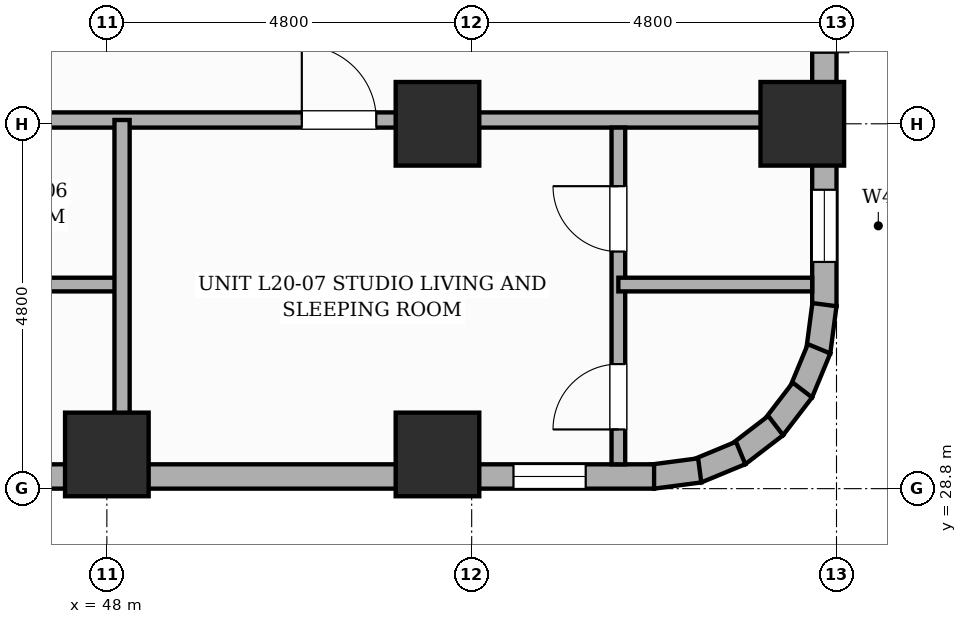
"""IFC4 building model, lengths in metres.
Left out: names, types, materials, properties, quantities, classifications, styles, units other than length and angle.
Written with IfcOpenShell. Run it as: python <this file> out.ifc"""

import sys

from ifc_helpers import new_model, si_unit, direction, frame, frame_2d, origin, origin_2d, place, context, subcontext, project, spatial, rectangle, extrude, element, fill, save


model = new_model("IFC4")
c1 = context("Model", 3, precision=1e-05, world=origin(), true_north=direction((0.0, 1.0)))
c2 = subcontext(c1, "Body", "Model", "MODEL_VIEW")
j1 = project(units=[si_unit("LENGTHUNIT", "METRE"), si_unit("PLANEANGLEUNIT", "RADIAN")], contexts=[c1])
p1 = place(None, origin())
s1 = spatial("IfcSite", under=j1, at=p1, CompositionType="ELEMENT")
p2 = place(p1, origin())
s2 = spatial("IfcBuilding", under=s1, at=p2, CompositionType="ELEMENT")
p3 = place(p2, frame((0.0, 0.0, 79.0)))
s3 = spatial("IfcBuildingStorey", under=s2, at=p3, CompositionType="ELEMENT", Elevation=79.0)
for number, where, z_axis, x_axis in (
    (1, (48.0, 29.25, 0.0), (0.0, 0.0, 1.0), (1.0, 0.0, 0.0)),
    (2, (52.35, 29.25, 0.0), (0.0, 0.0, 1.0), (1.0, 0.0, 0.0)),
    (3, (52.35, 33.6, 0.0), (0.0, 0.0, 1.0), (1.0, 0.0, 0.0)),
    (4, (57.15, 33.6, 0.0), (0.0, 0.0, 1.0), (1.0, 0.0, 0.0)),
):
    element("IfcColumn", number, at=place(p3, frame(where, z_axis=z_axis, x_axis=x_axis)), inside=s3, PredefinedType="COLUMN", context=c2, shape_type="SweptSolid", body=[
        extrude(rectangle(XDim=1.1, YDim=1.1, at=origin_2d()), origin(), (0.0, 0.0, 1.0), 3.6),
    ])
p4 = place(p3, frame((57.44, 45.6, 0.0), z_axis=(0.0, 0.0, 1.0), x_axis=(0.0, -1.0, 0.0)))
e5 = element("IfcWall", 5, at=p4, inside=s3, PredefinedType="STANDARD", context=c2, shape_type="SweptSolid", body=[
    extrude(rectangle(XDim=14.4, YDim=0.32, at=frame_2d((7.2, 0.0))), origin(), (0.0, 0.0, 1.0), 2.53),
])
p5 = place(p4, frame((4.75, 0.0, 0.0)))
e6 = element("IfcOpeningElement", 6, at=p5, cuts=e5, PredefinedType="OPENING", context=c2, shape_type="SweptSolid", body=[
    extrude(rectangle(XDim=1.1, YDim=2.15, at=frame_2d((0.55, 1.075))), frame((0.0, 0.17, 0.0), z_axis=(0.0, -1.0, 0.0), x_axis=(1.0, 0.0, 0.0)), (0.0, 0.0, 1.0), 0.34),
])
p6 = place(p4, frame((0.47, 0.0, 0.45)))
e7 = element("IfcOpeningElement", 7, at=p6, cuts=e5, PredefinedType="OPENING", context=c2, shape_type="SweptSolid", body=[
    extrude(rectangle(XDim=0.95, YDim=1.8, at=frame_2d((0.475, 0.9))), frame((0.0, 0.17, 0.0), z_axis=(0.0, -1.0, 0.0), x_axis=(1.0, 0.0, 0.0)), (0.0, 0.0, 1.0), 0.34),
])
p7 = place(p4, frame((10.115, 0.0, 0.45)))
e8 = element("IfcOpeningElement", 8, at=p7, cuts=e5, PredefinedType="OPENING", context=c2, shape_type="SweptSolid", body=[
    extrude(rectangle(XDim=0.95, YDim=1.8, at=frame_2d((0.475, 0.9))), frame((0.0, 0.17, 0.0), z_axis=(0.0, -1.0, 0.0), x_axis=(1.0, 0.0, 0.0)), (0.0, 0.0, 1.0), 0.34),
])
p8 = place(p4, frame((12.867, 0.0, 0.45)))
e9 = element("IfcOpeningElement", 9, at=p8, cuts=e5, PredefinedType="OPENING", context=c2, shape_type="SweptSolid", body=[
    extrude(rectangle(XDim=0.95, YDim=1.8, at=frame_2d((0.475, 0.9))), frame((0.0, 0.17, 0.0), z_axis=(0.0, -1.0, 0.0), x_axis=(1.0, 0.0, 0.0)), (0.0, 0.0, 1.0), 0.34),
])
p9 = place(p4, frame((8.05, 0.0, 0.65)))
e10 = element("IfcOpeningElement", 10, at=p9, cuts=e5, PredefinedType="OPENING", context=c2, shape_type="SweptSolid", body=[
    extrude(rectangle(XDim=1.4, YDim=1.1, at=frame_2d((0.7, 0.55))), frame((0.0, 0.17, 0.0), z_axis=(0.0, -1.0, 0.0), x_axis=(1.0, 0.0, 0.0)), (0.0, 0.0, 1.0), 0.34),
])
p10 = place(p4, frame((3.194, 0.0, 0.45)))
e11 = element("IfcOpeningElement", 11, at=p10, cuts=e5, PredefinedType="OPENING", context=c2, shape_type="SweptSolid", body=[
    extrude(rectangle(XDim=0.95, YDim=1.8, at=frame_2d((0.475, 0.9))), frame((0.0, 0.17, 0.0), z_axis=(0.0, -1.0, 0.0), x_axis=(1.0, 0.0, 0.0)), (0.0, 0.0, 1.0), 0.34),
])
p11 = place(p3, frame((57.441, 31.221, 0.0), z_axis=(0.0, 0.0, 1.0), x_axis=(-0.130504898859, -0.991447664465, 0.0)))
e12 = element("IfcWall", 12, at=p11, inside=s3, PredefinedType="STANDARD", context=c2, shape_type="SweptSolid", body=[
    extrude(rectangle(XDim=0.627, YDim=0.32, at=frame_2d((0.313, 0.0))), origin(), (0.0, 0.0, 1.0), 3.35),
])
p12 = place(p3, frame((57.37, 30.64, 0.0), z_axis=(0.0, 0.0, 1.0), x_axis=(-0.382787856107, -0.923836271867, 0.0)))
e13 = element("IfcWall", 13, at=p12, inside=s3, PredefinedType="STANDARD", context=c2, shape_type="SweptSolid", body=[
    extrude(rectangle(XDim=0.626, YDim=0.32, at=frame_2d((0.313, 0.0))), origin(), (0.0, 0.0, 1.0), 3.35),
])
p13 = place(p3, frame((57.152, 30.097, 0.0), z_axis=(0.0, 0.0, 1.0), x_axis=(-0.608693302629, -0.793405610854, 0.0)))
e14 = element("IfcWall", 14, at=p13, inside=s3, PredefinedType="STANDARD", context=c2, shape_type="SweptSolid", body=[
    extrude(rectangle(XDim=0.626, YDim=0.32, at=frame_2d((0.313, 0.0))), origin(), (0.0, 0.0, 1.0), 3.35),
])
p14 = place(p3, frame((56.8, 29.63, 0.0), z_axis=(0.0, 0.0, 1.0), x_axis=(-0.793361818833, -0.608750379399, 0.0)))
e15 = element("IfcWall", 15, at=p14, inside=s3, PredefinedType="STANDARD", context=c2, shape_type="SweptSolid", body=[
    extrude(rectangle(XDim=0.627, YDim=0.32, at=frame_2d((0.313, 0.0))), origin(), (0.0, 0.0, 1.0), 3.35),
])
for number, where, z_axis, x_axis in (
    (16, (56.339, 29.269, 0.0), (0.0, 0.0, 1.0), (-0.924, -0.383, 0.0)),
    (17, (55.8, 29.04, 0.0), (0.0, 0.0, 1.0), (-0.991, -0.131, 0.0)),
):
    element("IfcWall", number, at=place(p3, frame(where, z_axis=z_axis, x_axis=x_axis)), inside=s3, PredefinedType="STANDARD", context=c2, shape_type="SweptSolid", body=[
        extrude(rectangle(XDim=0.626, YDim=0.32, at=frame_2d((0.313, 0.0))), origin(), (0.0, 0.0, 1.0), 3.35),
    ])
p15 = place(p3, frame((55.2, 28.96, 0.0), z_axis=(0.0, 0.0, 1.0), x_axis=(-1.0, 0.0, 0.0)))
e18 = element("IfcWall", 18, at=p15, inside=s3, PredefinedType="STANDARD", context=c2, shape_type="SweptSolid", body=[
    extrude(rectangle(XDim=28.8, YDim=0.32, at=frame_2d((14.4, 0.0))), origin(), (0.0, 0.0, 1.0), 2.53),
])
p16 = place(p15, frame((24.64, 0.0, 0.45)))
e19 = element("IfcOpeningElement", 19, at=p16, cuts=e18, PredefinedType="OPENING", context=c2, shape_type="SweptSolid", body=[
    extrude(rectangle(XDim=0.95, YDim=1.8, at=frame_2d((0.475, 0.9))), frame((0.0, 0.17, 0.0), z_axis=(0.0, -1.0, 0.0), x_axis=(1.0, 0.0, 0.0)), (0.0, 0.0, 1.0), 0.34),
])
p17 = place(p15, frame((19.979, 0.0, 0.45)))
e20 = element("IfcOpeningElement", 20, at=p17, cuts=e18, PredefinedType="OPENING", context=c2, shape_type="SweptSolid", body=[
    extrude(rectangle(XDim=0.75, YDim=1.8, at=frame_2d((0.375, 0.9))), frame((0.0, 0.17, 0.0), z_axis=(0.0, -1.0, 0.0), x_axis=(1.0, 0.0, 0.0)), (0.0, 0.0, 1.0), 0.34),
])
p18 = place(p15, frame((10.374, 0.0, 0.45)))
e21 = element("IfcOpeningElement", 21, at=p18, cuts=e18, PredefinedType="OPENING", context=c2, shape_type="SweptSolid", body=[
    extrude(rectangle(XDim=0.75, YDim=1.8, at=frame_2d((0.375, 0.9))), frame((0.0, 0.17, 0.0), z_axis=(0.0, -1.0, 0.0), x_axis=(1.0, 0.0, 0.0)), (0.0, 0.0, 1.0), 0.34),
])
p19 = place(p15, frame((0.9, 0.0, 0.45)))
e22 = element("IfcOpeningElement", 22, at=p19, cuts=e18, PredefinedType="OPENING", context=c2, shape_type="SweptSolid", body=[
    extrude(rectangle(XDim=0.95, YDim=1.8, at=frame_2d((0.475, 0.9))), frame((0.0, 0.17, 0.0), z_axis=(0.0, -1.0, 0.0), x_axis=(1.0, 0.0, 0.0)), (0.0, 0.0, 1.0), 0.34),
])
p20 = place(p15, frame((17.824, 0.0, 0.65)))
e23 = element("IfcOpeningElement", 23, at=p20, cuts=e18, PredefinedType="OPENING", context=c2, shape_type="SweptSolid", body=[
    extrude(rectangle(XDim=1.4, YDim=1.1, at=frame_2d((0.7, 0.55))), frame((0.0, 0.17, 0.0), z_axis=(0.0, -1.0, 0.0), x_axis=(1.0, 0.0, 0.0)), (0.0, 0.0, 1.0), 0.34),
])
p21 = place(p15, frame((8.219, 0.0, 0.65)))
e24 = element("IfcOpeningElement", 24, at=p21, cuts=e18, PredefinedType="OPENING", context=c2, shape_type="SweptSolid", body=[
    extrude(rectangle(XDim=1.4, YDim=1.1, at=frame_2d((0.7, 0.55))), frame((0.0, 0.17, 0.0), z_axis=(0.0, -1.0, 0.0), x_axis=(1.0, 0.0, 0.0)), (0.0, 0.0, 1.0), 0.34),
])
p22 = place(p3, frame((22.75, 33.65, 0.0), z_axis=(0.0, 0.0, 1.0), x_axis=(1.0, 0.0, 0.0)))
e25 = element("IfcWall", 25, at=p22, inside=s3, PredefinedType="PARTITIONING", context=c2, shape_type="SweptSolid", body=[
    extrude(rectangle(XDim=34.53, YDim=0.2, at=frame_2d((17.265, 0.0))), origin(), (0.0, 0.0, 1.0), 2.53),
])
p23 = place(p22, frame((5.495, 0.0, 0.0)))
e26 = element("IfcOpeningElement", 26, at=p23, cuts=e25, PredefinedType="OPENING", context=c2, shape_type="SweptSolid", body=[
    extrude(rectangle(XDim=0.98, YDim=2.18, at=frame_2d((0.49, 1.09))), frame((0.0, 0.11, 0.0), z_axis=(0.0, -1.0, 0.0), x_axis=(1.0, 0.0, 0.0)), (0.0, 0.0, 1.0), 0.22),
])
p24 = place(p22, frame((9.961, 0.0, 0.0)))
e27 = element("IfcOpeningElement", 27, at=p24, cuts=e25, PredefinedType="OPENING", context=c2, shape_type="SweptSolid", body=[
    extrude(rectangle(XDim=0.98, YDim=2.18, at=frame_2d((0.49, 1.09))), frame((0.0, 0.11, 0.0), z_axis=(0.0, -1.0, 0.0), x_axis=(1.0, 0.0, 0.0)), (0.0, 0.0, 1.0), 0.22),
])
p25 = place(p22, frame((19.066, 0.0, 0.0)))
e28 = element("IfcOpeningElement", 28, at=p25, cuts=e25, PredefinedType="OPENING", context=c2, shape_type="SweptSolid", body=[
    extrude(rectangle(XDim=0.98, YDim=2.18, at=frame_2d((0.49, 1.09))), frame((0.0, 0.11, 0.0), z_axis=(0.0, -1.0, 0.0), x_axis=(1.0, 0.0, 0.0)), (0.0, 0.0, 1.0), 0.22),
])
p26 = place(p22, frame((27.815, 0.0, 0.0)))
e29 = element("IfcOpeningElement", 29, at=p26, cuts=e25, PredefinedType="OPENING", context=c2, shape_type="SweptSolid", body=[
    extrude(rectangle(XDim=0.98, YDim=2.18, at=frame_2d((0.49, 1.09))), frame((0.0, 0.11, 0.0), z_axis=(0.0, -1.0, 0.0), x_axis=(1.0, 0.0, 0.0)), (0.0, 0.0, 1.0), 0.22),
])
p27 = place(p3, frame((45.132, 31.485, 0.0), z_axis=(0.0, 0.0, 1.0), x_axis=(1.0, 0.0, 0.0)))
e30 = element("IfcWall", 30, at=p27, inside=s3, PredefinedType="PLUMBINGWALL", context=c2, shape_type="SweptSolid", body=[
    extrude(rectangle(XDim=3.068, YDim=0.18, at=frame_2d((1.534, 0.0))), origin(), (0.0, 0.0, 1.0), 3.35),
])
p28 = place(p3, frame((48.2, 29.12, 0.0), z_axis=(0.0, 0.0, 1.0), x_axis=(0.0, 1.0, 0.0)))
e31 = element("IfcWall", 31, at=p28, inside=s3, PredefinedType="SOLIDWALL", context=c2, shape_type="SweptSolid", body=[
    extrude(rectangle(XDim=4.53, YDim=0.2, at=frame_2d((2.265, 0.0))), origin(), (0.0, 0.0, 1.0), 2.53),
])
p29 = place(p3, frame((54.73, 29.12, 0.0), z_axis=(0.0, 0.0, 1.0), x_axis=(0.0, 1.0, 0.0)))
e32 = element("IfcWall", 32, at=p29, inside=s3, PredefinedType="PLUMBINGWALL", context=c2, shape_type="SweptSolid", body=[
    extrude(rectangle(XDim=4.43, YDim=0.18, at=frame_2d((2.215, 0.0))), origin(), (0.0, 0.0, 1.0), 3.35),
])
p30 = place(p29, frame((0.459, 0.0, 0.0)))
e33 = element("IfcOpeningElement", 33, at=p30, cuts=e32, PredefinedType="OPENING", context=c2, shape_type="SweptSolid", body=[
    extrude(rectangle(XDim=0.86, YDim=2.1, at=frame_2d((0.43, 1.05))), frame((0.0, 0.1, 0.0), z_axis=(0.0, -1.0, 0.0), x_axis=(1.0, 0.0, 0.0)), (0.0, 0.0, 1.0), 0.2),
])
p31 = place(p29, frame((2.799, 0.0, 0.0)))
e34 = element("IfcOpeningElement", 34, at=p31, cuts=e32, PredefinedType="OPENING", context=c2, shape_type="SweptSolid", body=[
    extrude(rectangle(XDim=0.86, YDim=2.1, at=frame_2d((0.43, 1.05))), frame((0.0, 0.1, 0.0), z_axis=(0.0, -1.0, 0.0), x_axis=(1.0, 0.0, 0.0)), (0.0, 0.0, 1.0), 0.2),
])
p32 = place(p3, frame((54.73, 31.485, 0.0), z_axis=(0.0, 0.0, 1.0), x_axis=(1.0, 0.0, 0.0)))
e35 = element("IfcWall", 35, at=p32, inside=s3, PredefinedType="PLUMBINGWALL", context=c2, shape_type="SweptSolid", body=[
    extrude(rectangle(XDim=2.55, YDim=0.18, at=frame_2d((1.275, 0.0))), origin(), (0.0, 0.0, 1.0), 3.35),
])
p33 = place(p7, origin())
e36 = element("IfcWindow", 36, at=p33, inside=s3, PartitioningType="SINGLE_PANEL", PredefinedType="WINDOW", context=c2, shape_type="SweptSolid", body=[
    extrude(rectangle(XDim=0.95, YDim=1.8, at=frame_2d((0.475, 0.9))), frame((0.0, 0.03, 0.0), z_axis=(0.0, -1.0, 0.0), x_axis=(1.0, 0.0, 0.0)), (0.0, 0.0, 1.0), 0.06),
])
fill(e8, e36)
p34 = place(p8, origin())
e37 = element("IfcWindow", 37, at=p34, inside=s3, PartitioningType="SINGLE_PANEL", PredefinedType="WINDOW", context=c2, shape_type="SweptSolid", body=[
    extrude(rectangle(XDim=0.95, YDim=1.8, at=frame_2d((0.475, 0.9))), frame((0.0, 0.03, 0.0), z_axis=(0.0, -1.0, 0.0), x_axis=(1.0, 0.0, 0.0)), (0.0, 0.0, 1.0), 0.06),
])
fill(e9, e37)
p35 = place(p19, origin())
e38 = element("IfcWindow", 38, at=p35, inside=s3, PartitioningType="SINGLE_PANEL", PredefinedType="WINDOW", context=c2, shape_type="SweptSolid", body=[
    extrude(rectangle(XDim=0.95, YDim=1.8, at=frame_2d((0.475, 0.9))), frame((0.0, 0.03, 0.0), z_axis=(0.0, -1.0, 0.0), x_axis=(1.0, 0.0, 0.0)), (0.0, 0.0, 1.0), 0.06),
])
fill(e22, e38)
p36 = place(p26, origin())
e39 = element("IfcDoor", 39, at=p36, inside=s3, OperationType="SINGLE_SWING_LEFT", PredefinedType="DOOR", context=c2, shape_type="SweptSolid", body=[
    extrude(rectangle(XDim=0.98, YDim=2.18, at=frame_2d((0.49, 1.09))), frame((0.0, 0.025, 0.0), z_axis=(0.0, -1.0, 0.0), x_axis=(1.0, 0.0, 0.0)), (0.0, 0.0, 1.0), 0.05),
])
fill(e29, e39)
p37 = place(p30, origin())
e40 = element("IfcDoor", 40, at=p37, inside=s3, OperationType="SINGLE_SWING_LEFT", PredefinedType="DOOR", context=c2, shape_type="SweptSolid", body=[
    extrude(rectangle(XDim=0.86, YDim=2.1, at=frame_2d((0.43, 1.05))), frame((0.0, 0.025, 0.0), z_axis=(0.0, -1.0, 0.0), x_axis=(1.0, 0.0, 0.0)), (0.0, 0.0, 1.0), 0.05),
])
fill(e33, e40)
p38 = place(p31, origin())
e41 = element("IfcDoor", 41, at=p38, inside=s3, OperationType="SINGLE_SWING_RIGHT", PredefinedType="DOOR", context=c2, shape_type="SweptSolid", body=[
    extrude(rectangle(XDim=0.86, YDim=2.1, at=frame_2d((0.43, 1.05))), frame((0.0, 0.025, 0.0), z_axis=(0.0, -1.0, 0.0), x_axis=(1.0, 0.0, 0.0)), (0.0, 0.0, 1.0), 0.05),
])
fill(e34, e41)
save(model, sys.argv[1])
